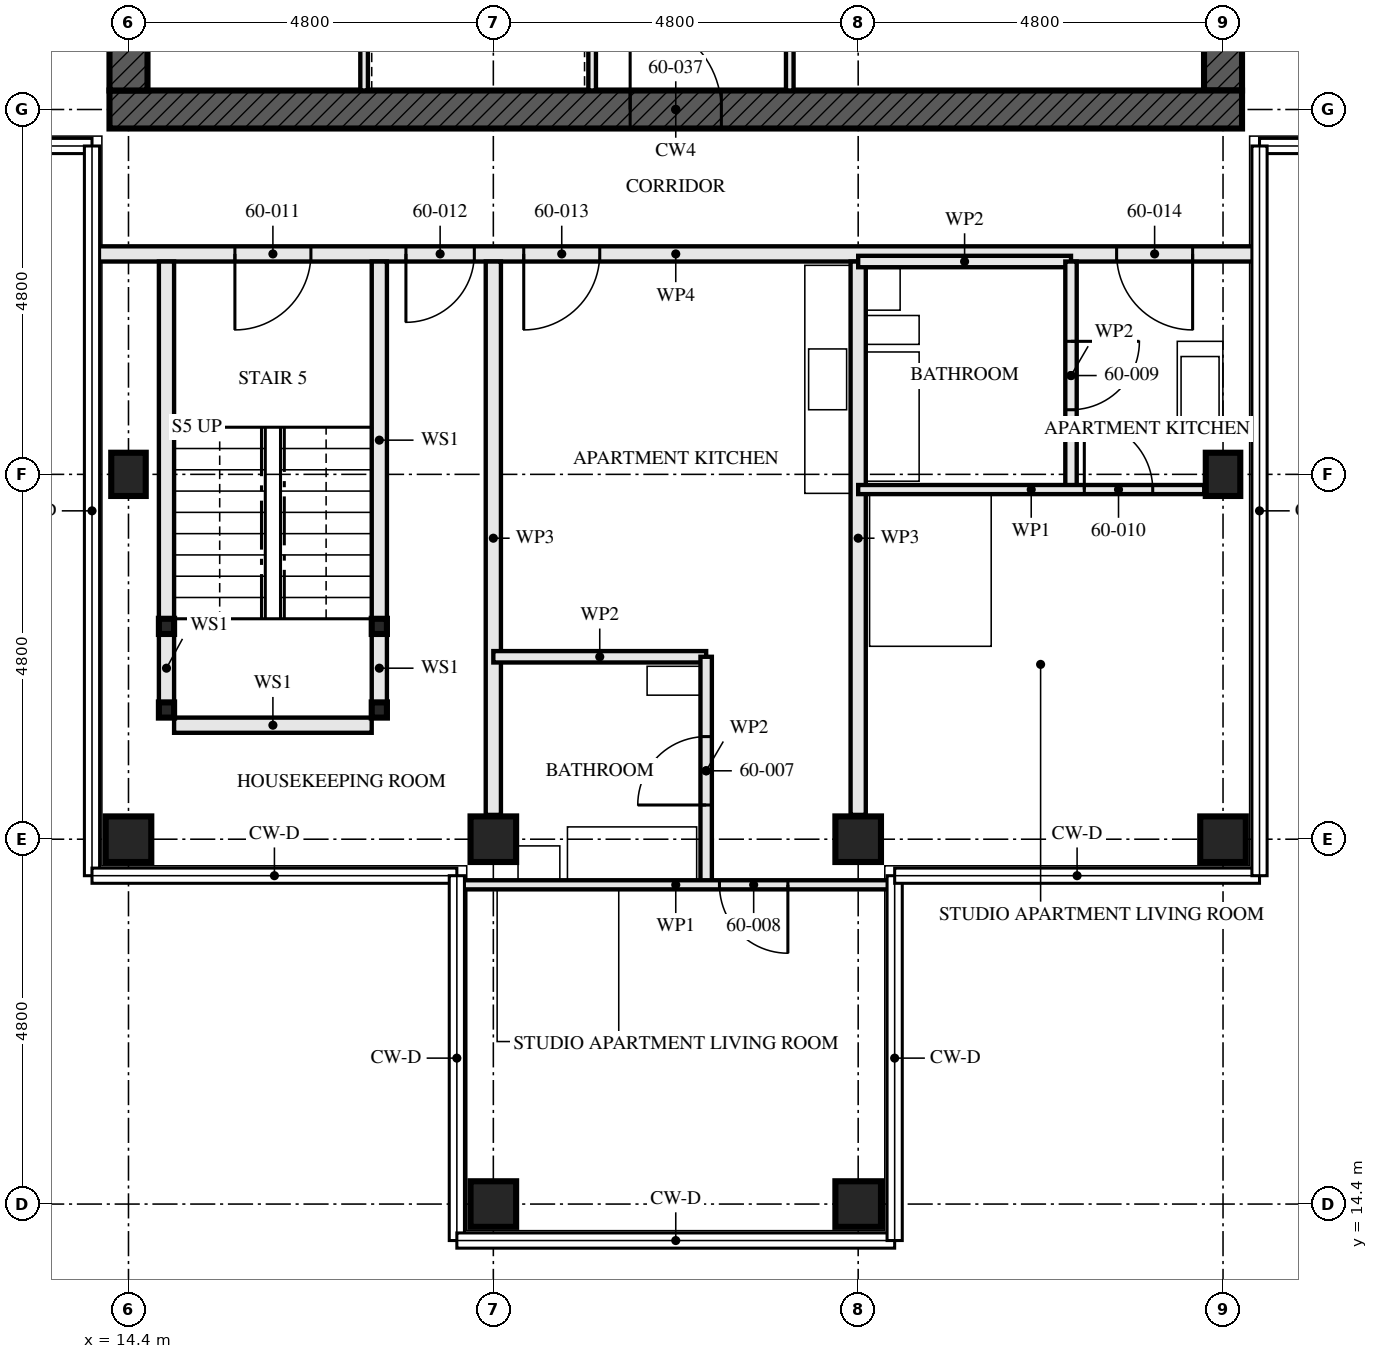
"""IFC4 building model, lengths in metres.
Left out: names, types, materials, properties, quantities, classifications, styles, units other than length and angle.
Written with IfcOpenShell. Run it as: python <this file> out.ifc"""

import sys

from ifc_helpers import new_model, si_unit, direction, frame, frame_2d, origin, origin_2d, place, context, subcontext, project, spatial, rectangle, hollow_rectangle, i_section, extrude, element, fill, save


model = new_model("IFC4")
c1 = context("Model", 3, precision=1e-05, world=origin(), true_north=direction((0.0, 1.0)))
c2 = subcontext(c1, "Body", "Model", "MODEL_VIEW")
j1 = project(units=[si_unit("LENGTHUNIT", "METRE"), si_unit("PLANEANGLEUNIT", "RADIAN")], contexts=[c1])
p1 = place(None, origin())
s1 = spatial("IfcSite", under=j1, at=p1, CompositionType="ELEMENT")
p2 = place(p1, origin())
s2 = spatial("IfcBuilding", under=s1, at=p2, CompositionType="ELEMENT")
p3 = place(p2, frame((0.0, 0.0, 219.0)))
s3 = spatial("IfcBuildingStorey", under=s2, at=p3, CompositionType="ELEMENT", Elevation=219.0)
p4 = place(p3, frame((14.4, 19.2, 0.0), z_axis=(0.0, 0.0, 1.0), x_axis=(0.0, 1.0, 0.0)))
e1 = element("IfcColumn", 1, at=p4, inside=s3, PredefinedType="COLUMN", context=c2, shape_type="SweptSolid", body=[
    extrude(hollow_rectangle(XDim=0.6, YDim=0.6, WallThickness=0.05, at=origin_2d()), origin(), (0.0, 0.0, 1.0), 3.5),
])
p5 = place(p3, frame((14.4, 24.0, 0.0), z_axis=(0.0, 0.0, 1.0), x_axis=(1.0, 0.0, 0.0)))
e2 = element("IfcColumn", 2, at=p5, inside=s3, PredefinedType="COLUMN", context=c2, shape_type="SweptSolid", body=[
    extrude(i_section(OverallWidth=0.454, OverallDepth=0.569, WebThickness=0.078, FlangeThickness=0.125, FilletRadius=0.015, at=origin_2d()), origin(), (0.0, 0.0, 1.0), 3.5),
])
for number, where, z_axis, x_axis in (
    (3, (19.2, 14.4, 0.0), (0.0, 0.0, 1.0), (0.0, 1.0, 0.0)),
    (4, (19.2, 19.2, 0.0), (0.0, 0.0, 1.0), (0.0, 1.0, 0.0)),
    (5, (24.0, 14.4, 0.0), (0.0, 0.0, 1.0), (0.0, 1.0, 0.0)),
    (6, (24.0, 19.2, 0.0), (0.0, 0.0, 1.0), (0.0, 1.0, 0.0)),
    (7, (28.8, 19.2, 0.0), (0.0, 0.0, 1.0), (0.0, 1.0, 0.0)),
):
    element("IfcColumn", number, at=place(p3, frame(where, z_axis=z_axis, x_axis=x_axis)), inside=s3, PredefinedType="COLUMN", context=c2, shape_type="SweptSolid", body=[
        extrude(hollow_rectangle(XDim=0.6, YDim=0.6, WallThickness=0.05, at=origin_2d()), origin(), (0.0, 0.0, 1.0), 3.5),
    ])
p6 = place(p3, frame((28.8, 24.0, 0.0), z_axis=(0.0, 0.0, 1.0), x_axis=(1.0, 0.0, 0.0)))
e8 = element("IfcColumn", 8, at=p6, inside=s3, PredefinedType="COLUMN", context=c2, shape_type="SweptSolid", body=[
    extrude(i_section(OverallWidth=0.454, OverallDepth=0.569, WebThickness=0.078, FlangeThickness=0.125, FilletRadius=0.015, at=origin_2d()), origin(), (0.0, 0.0, 1.0), 3.5),
])
p7 = place(p3, frame((14.15, 28.8, -0.17), z_axis=(0.0, 0.0, 1.0), x_axis=(1.0, 0.0, 0.0)))
e9 = element("IfcWall", 9, at=p7, inside=s3, PredefinedType="SHEAR", context=c2, shape_type="SweptSolid", body=[
    extrude(rectangle(XDim=14.9, YDim=0.5, at=frame_2d((7.45, 0.0))), origin(), (0.0, 0.0, 1.0), 3.5),
])
p8 = place(p7, frame((6.85, 0.0, 0.17)))
e10 = element("IfcOpeningElement", 10, at=p8, cuts=e9, PredefinedType="OPENING", context=c2, shape_type="SweptSolid", body=[
    extrude(rectangle(XDim=1.2, YDim=2.1, at=frame_2d((0.6, 1.05))), frame((0.0, 0.26, 0.0), z_axis=(0.0, -1.0, 0.0), x_axis=(1.0, 0.0, 0.0)), (0.0, 0.0, 1.0), 0.521),
])
p9 = place(p3, frame((14.4, 42.95, -0.17), z_axis=(0.0, 0.0, 1.0), x_axis=(0.0, -1.0, 0.0)))
e11 = element("IfcWall", 11, at=p9, inside=s3, PredefinedType="SHEAR", context=c2, shape_type="SweptSolid", body=[
    extrude(rectangle(XDim=13.9, YDim=0.5, at=frame_2d((6.95, 0.0))), origin(), (0.0, 0.0, 1.0), 3.5),
])
p10 = place(p9, frame((6.35, 0.0, 0.17)))
e12 = element("IfcOpeningElement", 12, at=p10, cuts=e11, PredefinedType="OPENING", context=c2, shape_type="SweptSolid", body=[
    extrude(rectangle(XDim=1.2, YDim=2.1, at=frame_2d((0.6, 1.05))), frame((0.0, 0.26, 0.0), z_axis=(0.0, -1.0, 0.0), x_axis=(1.0, 0.0, 0.0)), (0.0, 0.0, 1.0), 0.521),
])
p11 = place(p3, frame((28.8, 29.05, -0.17), z_axis=(0.0, 0.0, 1.0), x_axis=(0.0, 1.0, 0.0)))
e13 = element("IfcWall", 13, at=p11, inside=s3, PredefinedType="SHEAR", context=c2, shape_type="SweptSolid", body=[
    extrude(rectangle(XDim=13.9, YDim=0.5, at=frame_2d((6.95, 0.0))), origin(), (0.0, 0.0, 1.0), 3.5),
])
p12 = place(p11, frame((6.35, 0.0, 0.17)))
e14 = element("IfcOpeningElement", 14, at=p12, cuts=e13, PredefinedType="OPENING", context=c2, shape_type="SweptSolid", body=[
    extrude(rectangle(XDim=1.2, YDim=2.1, at=frame_2d((0.6, 1.05))), frame((0.0, 0.26, 0.0), z_axis=(0.0, -1.0, 0.0), x_axis=(1.0, 0.0, 0.0)), (0.0, 0.0, 1.0), 0.521),
])
for number, where, z_axis, x_axis in (
    (15, (14.9, 20.9, 0.0), (0.0, 0.0, 1.0), (1.0, 0.0, 0.0)),
    (16, (17.7, 20.9, 0.0), (0.0, 0.0, 1.0), (1.0, 0.0, 0.0)),
    (17, (14.9, 22.0, 0.0), (0.0, 0.0, 1.0), (1.0, 0.0, 0.0)),
    (18, (17.7, 22.0, 0.0), (0.0, 0.0, 1.0), (1.0, 0.0, 0.0)),
):
    element("IfcColumn", number, at=place(p3, frame(where, z_axis=z_axis, x_axis=x_axis)), inside=s3, PredefinedType="COLUMN", context=c2, shape_type="SweptSolid", body=[
        extrude(hollow_rectangle(XDim=0.2, YDim=0.2, WallThickness=0.008, at=origin_2d()), origin(), (0.0, 0.0, 1.0), 3.33),
    ])
p13 = place(p3, frame((14.9, 21.0, 0.0), z_axis=(0.0, 0.0, 1.0), x_axis=(0.0, 1.0, 0.0)))
e19 = element("IfcWall", 19, at=p13, inside=s3, PredefinedType="SOLIDWALL", context=c2, shape_type="SweptSolid", body=[
    extrude(rectangle(XDim=0.9, YDim=0.2, at=frame_2d((0.45, 0.0))), origin(), (0.0, 0.0, 1.0), 2.99),
])
p14 = place(p3, frame((14.9, 22.1, 0.0), z_axis=(0.0, 0.0, 1.0), x_axis=(0.0, 1.0, 0.0)))
e20 = element("IfcWall", 20, at=p14, inside=s3, PredefinedType="SOLIDWALL", context=c2, shape_type="SweptSolid", body=[
    extrude(rectangle(XDim=4.7, YDim=0.2, at=frame_2d((2.35, 0.0))), origin(), (0.0, 0.0, 1.0), 2.99),
])
p15 = place(p3, frame((17.7, 21.0, 0.0), z_axis=(0.0, 0.0, 1.0), x_axis=(0.0, 1.0, 0.0)))
e21 = element("IfcWall", 21, at=p15, inside=s3, PredefinedType="SOLIDWALL", context=c2, shape_type="SweptSolid", body=[
    extrude(rectangle(XDim=0.9, YDim=0.2, at=frame_2d((0.45, 0.0))), origin(), (0.0, 0.0, 1.0), 2.99),
])
p16 = place(p3, frame((17.7, 22.1, 0.0), z_axis=(0.0, 0.0, 1.0), x_axis=(0.0, 1.0, 0.0)))
e22 = element("IfcWall", 22, at=p16, inside=s3, PredefinedType="SOLIDWALL", context=c2, shape_type="SweptSolid", body=[
    extrude(rectangle(XDim=4.7, YDim=0.2, at=frame_2d((2.35, 0.0))), origin(), (0.0, 0.0, 1.0), 2.99),
])
p17 = place(p3, frame((15.0, 20.7, 0.0), z_axis=(0.0, 0.0, 1.0), x_axis=(1.0, 0.0, 0.0)))
e23 = element("IfcWall", 23, at=p17, inside=s3, PredefinedType="SOLIDWALL", context=c2, shape_type="SweptSolid", body=[
    extrude(rectangle(XDim=2.6, YDim=0.2, at=frame_2d((1.3, 0.0))), origin(), (0.0, 0.0, 1.0), 3.33),
])
p18 = place(p3, frame((19.2, 19.52, 0.0), z_axis=(0.0, 0.0, 1.0), x_axis=(0.0, 1.0, 0.0)))
e24 = element("IfcWall", 24, at=p18, inside=s3, PredefinedType="PARTITIONING", context=c2, shape_type="SweptSolid", body=[
    extrude(rectangle(XDim=7.28, YDim=0.2, at=frame_2d((3.64, 0.0))), origin(), (0.0, 0.0, 1.0), 2.55),
])
p19 = place(p3, frame((22.0, 18.6, 0.0), z_axis=(0.0, 0.0, 1.0), x_axis=(0.0, 1.0, 0.0)))
e25 = element("IfcWall", 25, at=p19, inside=s3, PredefinedType="PARTITIONING", context=c2, shape_type="SweptSolid", body=[
    extrude(rectangle(XDim=3.0, YDim=0.15, at=frame_2d((1.5, 0.0))), origin(), (0.0, 0.0, 1.0), 2.55),
])
p20 = place(p19, frame((1.05, 0.0, 0.0)))
e26 = element("IfcOpeningElement", 26, at=p20, cuts=e25, PredefinedType="OPENING", context=c2, shape_type="SweptSolid", body=[
    extrude(rectangle(XDim=0.9, YDim=2.1, at=frame_2d((0.45, 1.05))), frame((0.0, 0.085, 0.0), z_axis=(0.0, -1.0, 0.0), x_axis=(1.0, 0.0, 0.0)), (0.0, 0.0, 1.0), 0.171),
])
p21 = place(p3, frame((19.2, 21.6, 0.0), z_axis=(0.0, 0.0, 1.0), x_axis=(1.0, 0.0, 0.0)))
e27 = element("IfcWall", 27, at=p21, inside=s3, PredefinedType="PARTITIONING", context=c2, shape_type="SweptSolid", body=[
    extrude(rectangle(XDim=2.8, YDim=0.15, at=frame_2d((1.4, 0.0))), origin(), (0.0, 0.0, 1.0), 3.33),
])
p22 = place(p3, frame((18.745, 18.6, 0.0), z_axis=(0.0, 0.0, 1.0), x_axis=(1.0, 0.0, 0.0)))
e28 = element("IfcWall", 28, at=p22, inside=s3, PredefinedType="PARTITIONING", context=c2, shape_type="SweptSolid", body=[
    extrude(rectangle(XDim=5.71, YDim=0.12, at=frame_2d((2.855, 0.0))), origin(), (0.0, 0.0, 1.0), 2.32),
])
p23 = place(p22, frame((3.43, 0.0, 0.0)))
e29 = element("IfcOpeningElement", 29, at=p23, cuts=e28, PredefinedType="OPENING", context=c2, shape_type="SweptSolid", body=[
    extrude(rectangle(XDim=0.9, YDim=2.1, at=frame_2d((0.45, 1.05))), frame((0.0, 0.071, 0.0), z_axis=(0.0, -1.0, 0.0), x_axis=(1.0, 0.0, 0.0)), (0.0, 0.0, 1.0), 0.141),
])
p24 = place(p3, frame((24.0, 19.52, 0.0), z_axis=(0.0, 0.0, 1.0), x_axis=(0.0, 1.0, 0.0)))
e30 = element("IfcWall", 30, at=p24, inside=s3, PredefinedType="PARTITIONING", context=c2, shape_type="SweptSolid", body=[
    extrude(rectangle(XDim=7.28, YDim=0.2, at=frame_2d((3.64, 0.0))), origin(), (0.0, 0.0, 1.0), 2.55),
])
p25 = place(p3, frame((26.8, 23.8, 0.0), z_axis=(0.0, 0.0, 1.0), x_axis=(0.0, 1.0, 0.0)))
e31 = element("IfcWall", 31, at=p25, inside=s3, PredefinedType="PARTITIONING", context=c2, shape_type="SweptSolid", body=[
    extrude(rectangle(XDim=3.0, YDim=0.15, at=frame_2d((1.5, 0.0))), origin(), (0.0, 0.0, 1.0), 2.55),
])
p26 = place(p25, frame((1.05, 0.0, 0.0)))
e32 = element("IfcOpeningElement", 32, at=p26, cuts=e31, PredefinedType="OPENING", context=c2, shape_type="SweptSolid", body=[
    extrude(rectangle(XDim=0.9, YDim=2.1, at=frame_2d((0.45, 1.05))), frame((0.0, 0.085, 0.0), z_axis=(0.0, -1.0, 0.0), x_axis=(1.0, 0.0, 0.0)), (0.0, 0.0, 1.0), 0.171),
])
p27 = place(p3, frame((24.0, 26.8, 0.0), z_axis=(0.0, 0.0, 1.0), x_axis=(1.0, 0.0, 0.0)))
e33 = element("IfcWall", 33, at=p27, inside=s3, PredefinedType="PARTITIONING", context=c2, shape_type="SweptSolid", body=[
    extrude(rectangle(XDim=2.8, YDim=0.15, at=frame_2d((1.4, 0.0))), origin(), (0.0, 0.0, 1.0), 3.33),
])
p28 = place(p3, frame((24.0, 23.8, 0.0), z_axis=(0.0, 0.0, 1.0), x_axis=(1.0, 0.0, 0.0)))
e34 = element("IfcWall", 34, at=p28, inside=s3, PredefinedType="PARTITIONING", context=c2, shape_type="SweptSolid", body=[
    extrude(rectangle(XDim=4.553, YDim=0.12, at=frame_2d((2.276, 0.0))), origin(), (0.0, 0.0, 1.0), 3.33),
])
p29 = place(p28, frame((2.975, 0.0, 0.0)))
e35 = element("IfcOpeningElement", 35, at=p29, cuts=e34, PredefinedType="OPENING", context=c2, shape_type="SweptSolid", body=[
    extrude(rectangle(XDim=0.9, YDim=2.1, at=frame_2d((0.45, 1.05))), frame((0.0, 0.071, 0.0), z_axis=(0.0, -1.0, 0.0), x_axis=(1.0, 0.0, 0.0)), (0.0, 0.0, 1.0), 0.141),
])
p30 = place(p3, frame((13.945, 26.9, 0.0), z_axis=(0.0, 0.0, 1.0), x_axis=(1.0, 0.0, 0.0)))
e36 = element("IfcWall", 36, at=p30, inside=s3, PredefinedType="PARTITIONING", context=c2, shape_type="SweptSolid", body=[
    extrude(rectangle(XDim=15.31, YDim=0.2, at=frame_2d((7.655, 0.0))), origin(), (0.0, 0.0, 1.0), 2.32),
])
p31 = place(p30, frame((1.855, 0.0, 0.0)))
e37 = element("IfcOpeningElement", 37, at=p31, cuts=e36, PredefinedType="OPENING", context=c2, shape_type="SweptSolid", body=[
    extrude(rectangle(XDim=1.0, YDim=2.1, at=frame_2d((0.5, 1.05))), frame((0.0, 0.111, 0.0), z_axis=(0.0, -1.0, 0.0), x_axis=(1.0, 0.0, 0.0)), (0.0, 0.0, 1.0), 0.221),
])
p32 = place(p30, frame((4.105, 0.0, 0.0)))
e38 = element("IfcOpeningElement", 38, at=p32, cuts=e36, PredefinedType="OPENING", context=c2, shape_type="SweptSolid", body=[
    extrude(rectangle(XDim=0.9, YDim=2.1, at=frame_2d((0.45, 1.05))), frame((0.0, 0.111, 0.0), z_axis=(0.0, -1.0, 0.0), x_axis=(1.0, 0.0, 0.0)), (0.0, 0.0, 1.0), 0.221),
])
p33 = place(p30, frame((5.655, 0.0, 0.0)))
e39 = element("IfcOpeningElement", 39, at=p33, cuts=e36, PredefinedType="OPENING", context=c2, shape_type="SweptSolid", body=[
    extrude(rectangle(XDim=1.0, YDim=2.1, at=frame_2d((0.5, 1.05))), frame((0.0, 0.111, 0.0), z_axis=(0.0, -1.0, 0.0), x_axis=(1.0, 0.0, 0.0)), (0.0, 0.0, 1.0), 0.221),
])
p34 = place(p30, frame((13.455, 0.0, 0.0)))
e40 = element("IfcOpeningElement", 40, at=p34, cuts=e36, PredefinedType="OPENING", context=c2, shape_type="SweptSolid", body=[
    extrude(rectangle(XDim=1.0, YDim=2.1, at=frame_2d((0.5, 1.05))), frame((0.0, 0.111, 0.0), z_axis=(0.0, -1.0, 0.0), x_axis=(1.0, 0.0, 0.0)), (0.0, 0.0, 1.0), 0.221),
])
p35 = place(p3, frame((20.5, 29.05, 0.0), z_axis=(0.0, 0.0, 1.0), x_axis=(0.0, 1.0, 0.0)))
e41 = element("IfcWall", 41, at=p35, inside=s3, PredefinedType="SOLIDWALL", context=c2, shape_type="SweptSolid", body=[
    extrude(rectangle(XDim=5.8, YDim=0.1, at=frame_2d((2.9, 0.0))), origin(), (0.0, 0.0, 1.0), 3.33),
])
p36 = place(p35, frame((0.8, 0.0, 0.0)))
e42 = element("IfcOpeningElement", 42, at=p36, cuts=e41, PredefinedType="OPENING", context=c2, shape_type="SweptSolid", body=[
    extrude(rectangle(XDim=1.1, YDim=2.3, at=frame_2d((0.55, 1.15))), frame((0.0, 0.061, 0.0), z_axis=(0.0, -1.0, 0.0), x_axis=(1.0, 0.0, 0.0)), (0.0, 0.0, 1.0), 0.121),
])
p37 = place(p35, frame((3.775, 0.0, 0.0)))
e43 = element("IfcOpeningElement", 43, at=p37, cuts=e41, PredefinedType="OPENING", context=c2, shape_type="SweptSolid", body=[
    extrude(rectangle(XDim=1.1, YDim=2.3, at=frame_2d((0.55, 1.15))), frame((0.0, 0.061, 0.0), z_axis=(0.0, -1.0, 0.0), x_axis=(1.0, 0.0, 0.0)), (0.0, 0.0, 1.0), 0.121),
])
p38 = place(p3, frame((23.1, 29.05, 0.0), z_axis=(0.0, 0.0, 1.0), x_axis=(0.0, 1.0, 0.0)))
e44 = element("IfcWall", 44, at=p38, inside=s3, PredefinedType="SOLIDWALL", context=c2, shape_type="SweptSolid", body=[
    extrude(rectangle(XDim=5.8, YDim=0.1, at=frame_2d((2.9, 0.0))), origin(), (0.0, 0.0, 1.0), 3.33),
])
p39 = place(p38, frame((1.0, 0.0, 0.0)))
e45 = element("IfcOpeningElement", 45, at=p39, cuts=e44, PredefinedType="OPENING", context=c2, shape_type="SweptSolid", body=[
    extrude(rectangle(XDim=0.7, YDim=2.1, at=frame_2d((0.35, 1.05))), frame((0.0, 0.061, 0.0), z_axis=(0.0, -1.0, 0.0), x_axis=(1.0, 0.0, 0.0)), (0.0, 0.0, 1.0), 0.121),
])
p40 = place(p3, frame((17.5, 29.05, 0.0), z_axis=(0.0, 0.0, 1.0), x_axis=(0.0, 1.0, 0.0)))
e46 = element("IfcWall", 46, at=p40, inside=s3, PredefinedType="SOLIDWALL", context=c2, shape_type="SweptSolid", body=[
    extrude(rectangle(XDim=5.8, YDim=0.1, at=frame_2d((2.9, 0.0))), origin(), (0.0, 0.0, 1.0), 3.33),
])
p41 = place(p20, origin())
e47 = element("IfcDoor", 47, at=p41, inside=s3, OperationType="SINGLE_SWING_RIGHT", PredefinedType="DOOR", context=c2, shape_type="SweptSolid", body=[
    extrude(rectangle(XDim=0.9, YDim=2.1, at=frame_2d((0.45, 1.05))), frame((0.0, 0.022, 0.0), z_axis=(0.0, -1.0, 0.0), x_axis=(1.0, 0.0, 0.0)), (0.0, 0.0, 1.0), 0.044),
])
fill(e26, e47)
p42 = place(p23, frame((0.9, 0.0, 0.0), z_axis=(0.0, 0.0, 1.0), x_axis=(-1.0, 0.0, 0.0)))
e48 = element("IfcDoor", 48, at=p42, inside=s3, OperationType="SINGLE_SWING_RIGHT", PredefinedType="DOOR", context=c2, shape_type="SweptSolid", body=[
    extrude(rectangle(XDim=0.9, YDim=2.1, at=frame_2d((0.45, 1.05))), frame((0.0, 0.022, 0.0), z_axis=(0.0, -1.0, 0.0), x_axis=(1.0, 0.0, 0.0)), (0.0, 0.0, 1.0), 0.044),
])
fill(e29, e48)
p43 = place(p26, frame((0.9, 0.0, 0.0), z_axis=(0.0, 0.0, 1.0), x_axis=(-1.0, 0.0, 0.0)))
e49 = element("IfcDoor", 49, at=p43, inside=s3, OperationType="SINGLE_SWING_RIGHT", PredefinedType="DOOR", context=c2, shape_type="SweptSolid", body=[
    extrude(rectangle(XDim=0.9, YDim=2.1, at=frame_2d((0.45, 1.05))), frame((0.0, 0.022, 0.0), z_axis=(0.0, -1.0, 0.0), x_axis=(1.0, 0.0, 0.0)), (0.0, 0.0, 1.0), 0.044),
])
fill(e32, e49)
p44 = place(p29, origin())
e50 = element("IfcDoor", 50, at=p44, inside=s3, OperationType="SINGLE_SWING_RIGHT", PredefinedType="DOOR", context=c2, shape_type="SweptSolid", body=[
    extrude(rectangle(XDim=0.9, YDim=2.1, at=frame_2d((0.45, 1.05))), frame((0.0, 0.022, 0.0), z_axis=(0.0, -1.0, 0.0), x_axis=(1.0, 0.0, 0.0)), (0.0, 0.0, 1.0), 0.044),
])
fill(e35, e50)
p45 = place(p31, frame((1.0, 0.0, 0.0), z_axis=(0.0, 0.0, 1.0), x_axis=(-1.0, 0.0, 0.0)))
e51 = element("IfcDoor", 51, at=p45, inside=s3, OperationType="SINGLE_SWING_LEFT", PredefinedType="DOOR", context=c2, shape_type="SweptSolid", body=[
    extrude(rectangle(XDim=1.0, YDim=2.1, at=frame_2d((0.5, 1.05))), frame((0.0, 0.032, 0.0), z_axis=(0.0, -1.0, 0.0), x_axis=(1.0, 0.0, 0.0)), (0.0, 0.0, 1.0), 0.064),
])
fill(e37, e51)
p46 = place(p32, frame((0.9, 0.0, 0.0), z_axis=(0.0, 0.0, 1.0), x_axis=(-1.0, 0.0, 0.0)))
e52 = element("IfcDoor", 52, at=p46, inside=s3, OperationType="SINGLE_SWING_LEFT", PredefinedType="DOOR", context=c2, shape_type="SweptSolid", body=[
    extrude(rectangle(XDim=0.9, YDim=2.1, at=frame_2d((0.45, 1.05))), frame((0.0, 0.027, 0.0), z_axis=(0.0, -1.0, 0.0), x_axis=(1.0, 0.0, 0.0)), (0.0, 0.0, 1.0), 0.054),
])
fill(e38, e52)
p47 = place(p33, frame((1.0, 0.0, 0.0), z_axis=(0.0, 0.0, 1.0), x_axis=(-1.0, 0.0, 0.0)))
e53 = element("IfcDoor", 53, at=p47, inside=s3, OperationType="SINGLE_SWING_LEFT", PredefinedType="DOOR", context=c2, shape_type="SweptSolid", body=[
    extrude(rectangle(XDim=1.0, YDim=2.1, at=frame_2d((0.5, 1.05))), frame((0.0, 0.027, 0.0), z_axis=(0.0, -1.0, 0.0), x_axis=(1.0, 0.0, 0.0)), (0.0, 0.0, 1.0), 0.054),
])
fill(e39, e53)
p48 = place(p34, frame((1.0, 0.0, 0.0), z_axis=(0.0, 0.0, 1.0), x_axis=(-1.0, 0.0, 0.0)))
e54 = element("IfcDoor", 54, at=p48, inside=s3, OperationType="SINGLE_SWING_RIGHT", PredefinedType="DOOR", context=c2, shape_type="SweptSolid", body=[
    extrude(rectangle(XDim=1.0, YDim=2.1, at=frame_2d((0.5, 1.05))), frame((0.0, 0.027, 0.0), z_axis=(0.0, -1.0, 0.0), x_axis=(1.0, 0.0, 0.0)), (0.0, 0.0, 1.0), 0.054),
])
fill(e40, e54)
p49 = place(p8, origin())
e55 = element("IfcDoor", 55, at=p49, inside=s3, OperationType="SINGLE_SWING_LEFT", PredefinedType="DOOR", context=c2, shape_type="SweptSolid", body=[
    extrude(rectangle(XDim=1.2, YDim=2.1, at=frame_2d((0.6, 1.05))), frame((0.0, 0.027, 0.0), z_axis=(0.0, -1.0, 0.0), x_axis=(1.0, 0.0, 0.0)), (0.0, 0.0, 1.0), 0.054),
])
fill(e10, e55)
save(model, sys.argv[1])
